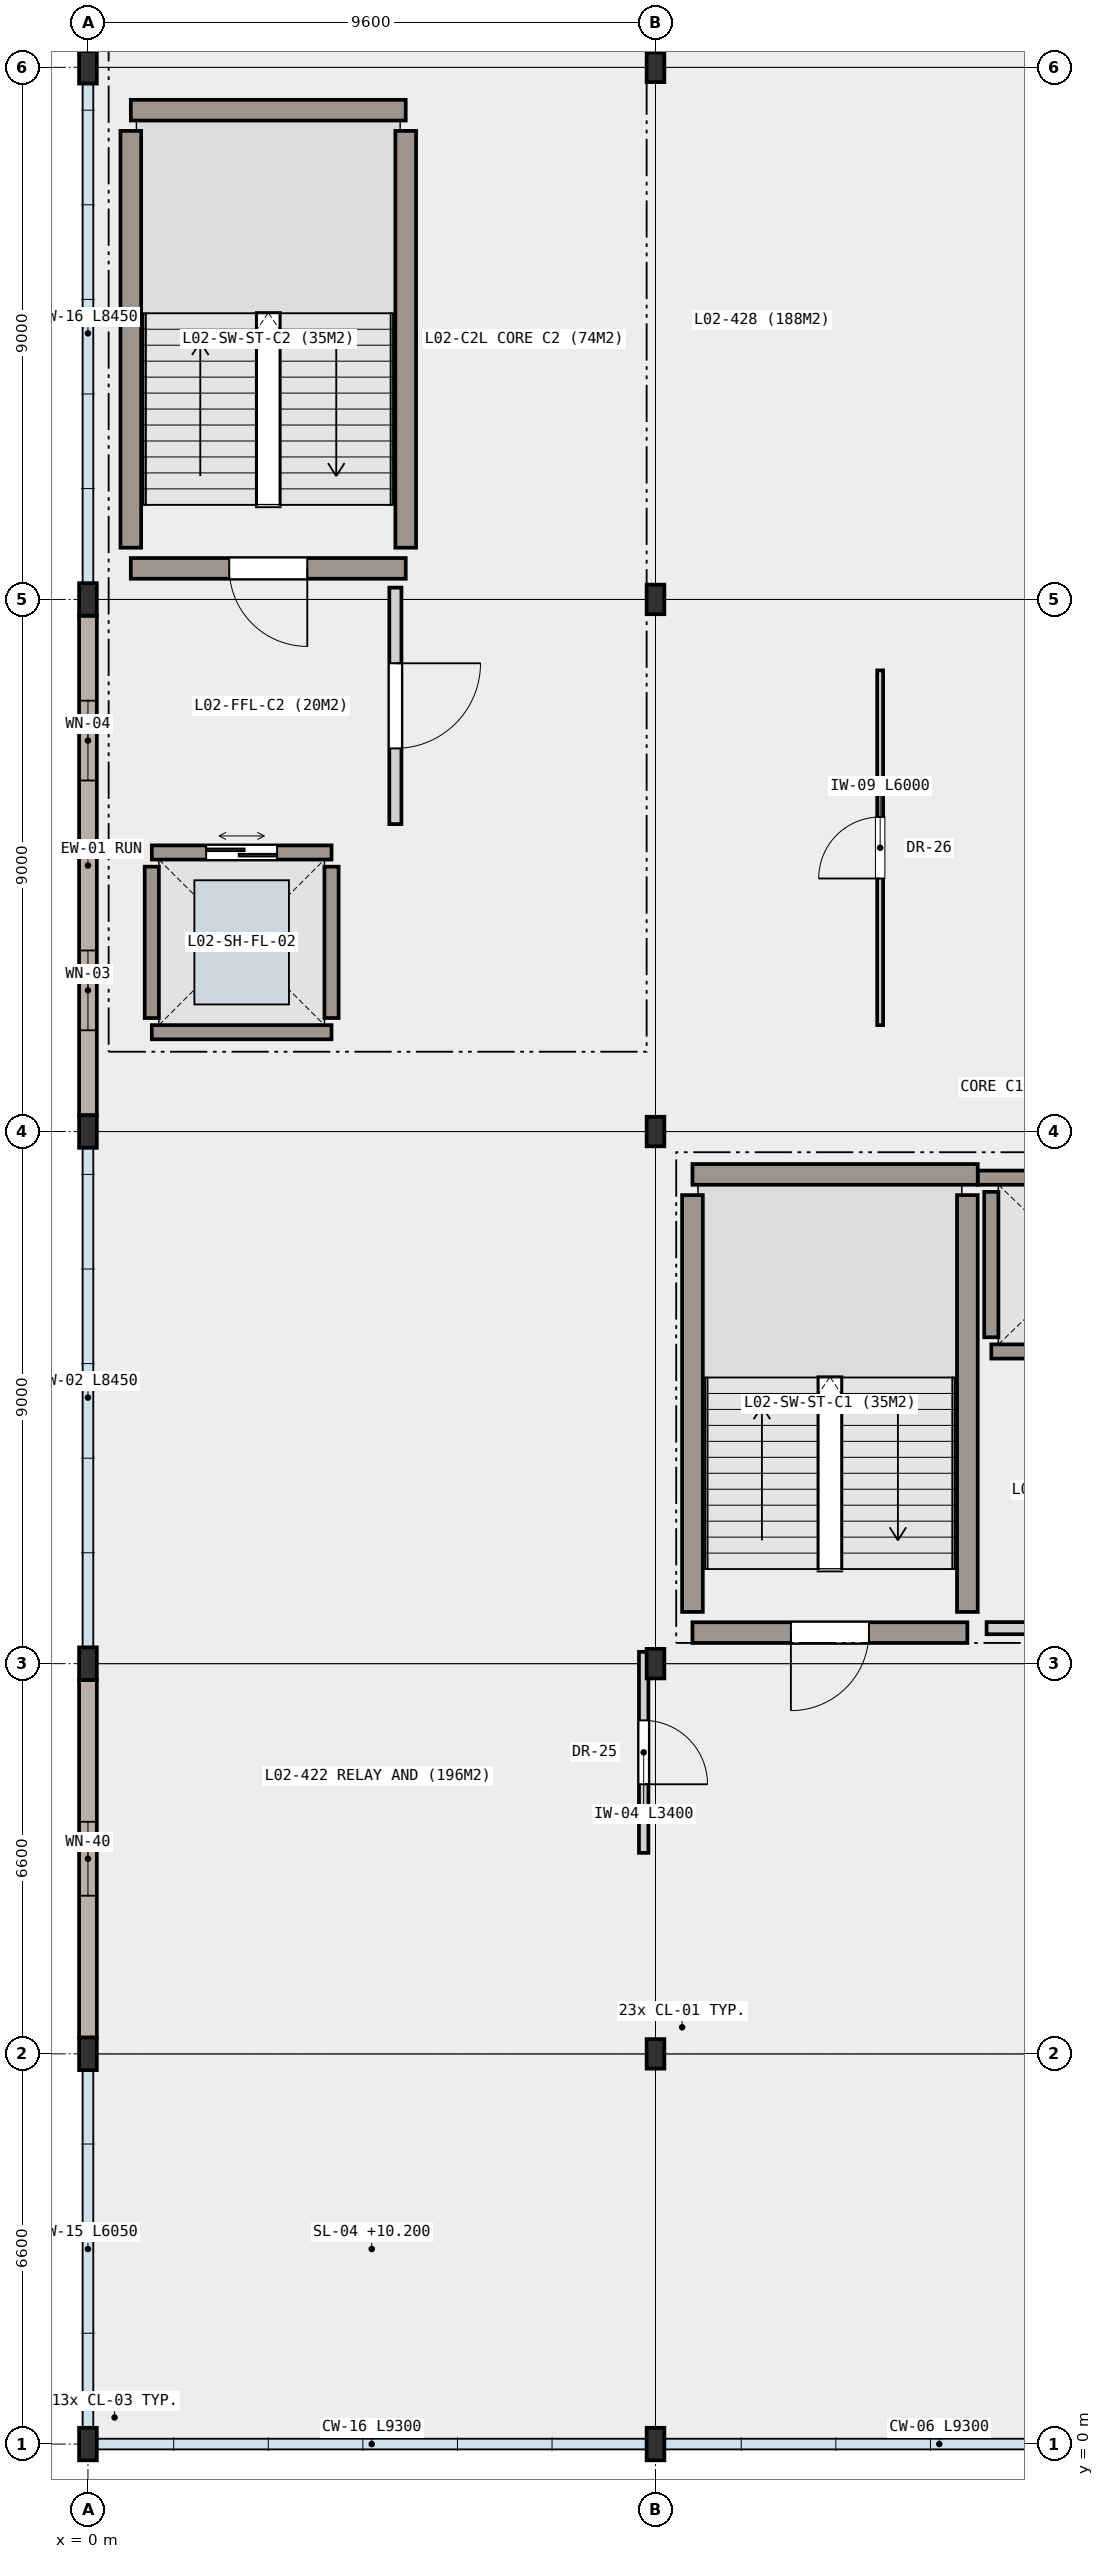
"""IFC4 building model, lengths in metres.
Left out: names, types, materials, properties, quantities, classifications, styles, units other than length and angle.
Written with IfcOpenShell. Run it as: python <this file> out.ifc"""

import sys

from ifc_helpers import new_model, si_unit, direction, frame, frame_2d, origin, origin_2d, place, context, subcontext, project, spatial, rectangle, i_section, extrude, element, fill, save


model = new_model("IFC4")
c1 = context("Model", 3, precision=1e-05, world=origin(), true_north=direction((0.0, 1.0)))
c2 = subcontext(c1, "Body", "Model", "MODEL_VIEW")
j1 = project(units=[si_unit("LENGTHUNIT", "METRE"), si_unit("PLANEANGLEUNIT", "RADIAN")], contexts=[c1])
p1 = place(None, origin())
s1 = spatial("IfcSite", under=j1, at=p1, CompositionType="ELEMENT")
p2 = place(p1, origin())
s2 = spatial("IfcBuilding", under=s1, at=p2, CompositionType="ELEMENT")
p3 = place(p2, frame((0.0, 0.0, 10.2)))
s3 = spatial("IfcBuildingStorey", under=s2, at=p3, CompositionType="ELEMENT", Elevation=10.2)
for number, where, z_axis, x_axis in (
    (1, (0.0, 0.0, 0.0), (0.0, 0.0, 1.0), (1.0, 0.0, 0.0)),
    (2, (0.0, 6.6, 0.0), (0.0, 0.0, 1.0), (1.0, 0.0, 0.0)),
    (3, (0.0, 13.2, 0.0), (0.0, 0.0, 1.0), (1.0, 0.0, 0.0)),
    (4, (0.0, 22.2, 0.0), (0.0, 0.0, 1.0), (1.0, 0.0, 0.0)),
    (5, (0.0, 31.2, 0.0), (0.0, 0.0, 1.0), (1.0, 0.0, 0.0)),
    (6, (0.0, 40.2, 0.0), (0.0, 0.0, 1.0), (1.0, 0.0, 0.0)),
    (7, (9.6, 0.0, 0.0), (0.0, 0.0, 1.0), (1.0, 0.0, 0.0)),
):
    element("IfcColumn", number, at=place(p3, frame(where, z_axis=z_axis, x_axis=x_axis)), inside=s3, PredefinedType="COLUMN", context=c2, shape_type="SweptSolid", body=[
        extrude(i_section(OverallWidth=0.3, OverallDepth=0.55, WebThickness=0.015, FlangeThickness=0.029, FilletRadius=0.027, at=origin_2d()), origin(), (0.0, 0.0, 1.0), 4.2),
    ])
for number, where, z_axis, x_axis in (
    (8, (9.6, 6.6, 0.0), (0.0, 0.0, 1.0), (1.0, 0.0, 0.0)),
    (9, (9.6, 13.2, 0.0), (0.0, 0.0, 1.0), (1.0, 0.0, 0.0)),
    (10, (9.6, 22.2, 0.0), (0.0, 0.0, 1.0), (1.0, 0.0, 0.0)),
    (11, (9.6, 31.2, 0.0), (0.0, 0.0, 1.0), (1.0, 0.0, 0.0)),
    (12, (9.6, 40.2, 0.0), (0.0, 0.0, 1.0), (1.0, 0.0, 0.0)),
):
    element("IfcColumn", number, at=place(p3, frame(where, z_axis=z_axis, x_axis=x_axis)), inside=s3, PredefinedType="COLUMN", context=c2, shape_type="SweptSolid", body=[
        extrude(i_section(OverallWidth=0.3, OverallDepth=0.5, WebThickness=0.014, FlangeThickness=0.028, FilletRadius=0.027, at=origin_2d()), origin(), (0.0, 0.0, 1.0), 4.2),
    ])
p4 = place(p3, frame((0.0, 6.875, 0.0), z_axis=(0.0, 0.0, 1.0), x_axis=(0.0, 1.0, 0.0)))
e13 = element("IfcWall", 13, at=p4, inside=s3, PredefinedType="SOLIDWALL", context=c2, shape_type="SweptSolid", body=[
    extrude(rectangle(XDim=6.05, YDim=0.3, at=frame_2d((3.025, 0.0))), origin(), (0.0, 0.0, 1.0), 3.52),
])
p5 = place(p4, frame((2.4, 0.0, 0.85)))
e14 = element("IfcOpeningElement", 14, at=p5, cuts=e13, PredefinedType="OPENING", context=c2, shape_type="SweptSolid", body=[
    extrude(rectangle(XDim=1.25, YDim=2.15, at=frame_2d((0.625, 1.075))), frame((0.0, 0.16, 0.0), z_axis=(0.0, -1.0, 0.0), x_axis=(1.0, 0.0, 0.0)), (0.0, 0.0, 1.0), 0.32),
])
p6 = place(p3, frame((0.0, 22.475, 0.0), z_axis=(0.0, 0.0, 1.0), x_axis=(0.0, 1.0, 0.0)))
e15 = element("IfcWall", 15, at=p6, inside=s3, PredefinedType="SOLIDWALL", context=c2, shape_type="SweptSolid", body=[
    extrude(rectangle(XDim=8.45, YDim=0.3, at=frame_2d((4.225, 0.0))), origin(), (0.0, 0.0, 1.0), 3.52),
])
p7 = place(p6, frame((1.438, 0.0, 0.85)))
e16 = element("IfcOpeningElement", 16, at=p7, cuts=e15, PredefinedType="OPENING", context=c2, shape_type="SweptSolid", body=[
    extrude(rectangle(XDim=1.35, YDim=1.5, at=frame_2d((0.675, 0.75))), frame((0.0, 0.16, 0.0), z_axis=(0.0, -1.0, 0.0), x_axis=(1.0, 0.0, 0.0)), (0.0, 0.0, 1.0), 0.32),
])
p8 = place(p6, frame((5.663, 0.0, 0.85)))
e17 = element("IfcOpeningElement", 17, at=p8, cuts=e15, PredefinedType="OPENING", context=c2, shape_type="SweptSolid", body=[
    extrude(rectangle(XDim=1.35, YDim=1.85, at=frame_2d((0.675, 0.925))), frame((0.0, 0.16, 0.0), z_axis=(0.0, -1.0, 0.0), x_axis=(1.0, 0.0, 0.0)), (0.0, 0.0, 1.0), 0.32),
])
p9 = place(p3, frame((18.32, 18.48, 0.0), z_axis=(0.0, 0.0, 1.0), x_axis=(-1.0, 0.0, 0.0)))
e18 = element("IfcWall", 18, at=p9, inside=s3, PredefinedType="SHEAR", context=c2, shape_type="SweptSolid", body=[
    extrude(rectangle(XDim=3.04, YDim=0.24, at=frame_2d((1.52, 0.0))), origin(), (0.0, 0.0, 1.0), 3.95),
])
p10 = place(p9, frame((0.92, 0.0, 0.0)))
e19 = element("IfcOpeningElement", 19, at=p10, cuts=e18, PredefinedType="OPENING", context=c2, shape_type="SweptSolid", body=[
    extrude(rectangle(XDim=1.2, YDim=2.15, at=frame_2d((0.6, 1.075))), frame((0.0, 0.13, 0.0), z_axis=(0.0, -1.0, 0.0), x_axis=(1.0, 0.0, 0.0)), (0.0, 0.0, 1.0), 0.26),
])
p11 = place(p3, frame((15.05, 21.42, 0.0), z_axis=(0.0, 0.0, 1.0), x_axis=(1.0, 0.0, 0.0)))
e20 = element("IfcWall", 20, at=p11, inside=s3, PredefinedType="SHEAR", context=c2, shape_type="SweptSolid", body=[
    extrude(rectangle(XDim=3.27, YDim=0.24, at=frame_2d((1.635, 0.0))), origin(), (0.0, 0.0, 1.0), 3.95),
])
p12 = place(p3, frame((15.28, 18.72, 0.0), z_axis=(0.0, 0.0, 1.0), x_axis=(0.0, 1.0, 0.0)))
e21 = element("IfcWall", 21, at=p12, inside=s3, PredefinedType="SHEAR", context=c2, shape_type="SweptSolid", body=[
    extrude(rectangle(XDim=2.46, YDim=0.24, at=frame_2d((1.23, 0.0))), origin(), (0.0, 0.0, 1.0), 3.95),
])
p13 = place(p3, frame((4.12, 23.88, 0.0), z_axis=(0.0, 0.0, 1.0), x_axis=(-1.0, 0.0, 0.0)))
e22 = element("IfcWall", 22, at=p13, inside=s3, PredefinedType="SHEAR", context=c2, shape_type="SweptSolid", body=[
    extrude(rectangle(XDim=3.04, YDim=0.24, at=frame_2d((1.52, 0.0))), origin(), (0.0, 0.0, 1.0), 3.95),
])
p14 = place(p3, frame((1.08, 26.92, 0.0), z_axis=(0.0, 0.0, 1.0), x_axis=(1.0, 0.0, 0.0)))
e23 = element("IfcWall", 23, at=p14, inside=s3, PredefinedType="SHEAR", context=c2, shape_type="SweptSolid", body=[
    extrude(rectangle(XDim=3.04, YDim=0.24, at=frame_2d((1.52, 0.0))), origin(), (0.0, 0.0, 1.0), 3.95),
])
p15 = place(p14, frame((0.92, 0.0, 0.0)))
e24 = element("IfcOpeningElement", 24, at=p15, cuts=e23, PredefinedType="OPENING", context=c2, shape_type="SweptSolid", body=[
    extrude(rectangle(XDim=1.2, YDim=2.15, at=frame_2d((0.6, 1.075))), frame((0.0, 0.13, 0.0), z_axis=(0.0, -1.0, 0.0), x_axis=(1.0, 0.0, 0.0)), (0.0, 0.0, 1.0), 0.26),
])
for number, where, z_axis, x_axis in (
    (25, (1.08, 24.12, 0.0), (0.0, 0.0, 1.0), (0.0, 1.0, 0.0)),
    (26, (4.12, 26.68, 0.0), (0.0, 0.0, 1.0), (0.0, -1.0, 0.0)),
):
    element("IfcWall", number, at=place(p3, frame(where, z_axis=z_axis, x_axis=x_axis)), inside=s3, PredefinedType="SHEAR", context=c2, shape_type="SweptSolid", body=[
        extrude(rectangle(XDim=2.56, YDim=0.24, at=frame_2d((1.28, 0.0))), origin(), (0.0, 0.0, 1.0), 3.95),
    ])
p16 = place(p3, frame((14.875, 13.725, 0.0), z_axis=(0.0, 0.0, 1.0), x_axis=(-1.0, 0.0, 0.0)))
e27 = element("IfcWall", 27, at=p16, inside=s3, PredefinedType="SHEAR", context=c2, shape_type="SweptSolid", body=[
    extrude(rectangle(XDim=4.65, YDim=0.35, at=frame_2d((2.325, 0.0))), origin(), (0.0, 0.0, 1.0), 3.95),
])
p17 = place(p16, frame((1.665, 0.0, 0.0)))
e28 = element("IfcOpeningElement", 28, at=p17, cuts=e27, PredefinedType="OPENING", context=c2, shape_type="SweptSolid", body=[
    extrude(rectangle(XDim=1.32, YDim=2.15, at=frame_2d((0.66, 1.075))), frame((0.0, 0.185, 0.0), z_axis=(0.0, -1.0, 0.0), x_axis=(1.0, 0.0, 0.0)), (0.0, 0.0, 1.0), 0.37),
])
p18 = place(p3, frame((10.225, 21.475, 0.0), z_axis=(0.0, 0.0, 1.0), x_axis=(1.0, 0.0, 0.0)))
e29 = element("IfcWall", 29, at=p18, inside=s3, PredefinedType="SHEAR", context=c2, shape_type="SweptSolid", body=[
    extrude(rectangle(XDim=4.825, YDim=0.35, at=frame_2d((2.413, 0.0))), origin(), (0.0, 0.0, 1.0), 3.95),
])
for number, where, z_axis, x_axis in (
    (30, (10.225, 14.075, 0.0), (0.0, 0.0, 1.0), (0.0, 1.0, 0.0)),
    (31, (14.875, 21.125, 0.0), (0.0, 0.0, 1.0), (0.0, -1.0, 0.0)),
):
    element("IfcWall", number, at=place(p3, frame(where, z_axis=z_axis, x_axis=x_axis)), inside=s3, PredefinedType="SHEAR", context=c2, shape_type="SweptSolid", body=[
        extrude(rectangle(XDim=7.05, YDim=0.35, at=frame_2d((3.525, 0.0))), origin(), (0.0, 0.0, 1.0), 3.95),
    ])
p19 = place(p3, frame((5.375, 31.725, 0.0), z_axis=(0.0, 0.0, 1.0), x_axis=(-1.0, 0.0, 0.0)))
e32 = element("IfcWall", 32, at=p19, inside=s3, PredefinedType="SHEAR", context=c2, shape_type="SweptSolid", body=[
    extrude(rectangle(XDim=4.65, YDim=0.35, at=frame_2d((2.325, 0.0))), origin(), (0.0, 0.0, 1.0), 3.95),
])
p20 = place(p19, frame((1.665, 0.0, 0.0)))
e33 = element("IfcOpeningElement", 33, at=p20, cuts=e32, PredefinedType="OPENING", context=c2, shape_type="SweptSolid", body=[
    extrude(rectangle(XDim=1.32, YDim=2.15, at=frame_2d((0.66, 1.075))), frame((0.0, 0.185, 0.0), z_axis=(0.0, -1.0, 0.0), x_axis=(1.0, 0.0, 0.0)), (0.0, 0.0, 1.0), 0.37),
])
p21 = place(p3, frame((0.725, 39.475, 0.0), z_axis=(0.0, 0.0, 1.0), x_axis=(1.0, 0.0, 0.0)))
e34 = element("IfcWall", 34, at=p21, inside=s3, PredefinedType="SHEAR", context=c2, shape_type="SweptSolid", body=[
    extrude(rectangle(XDim=4.65, YDim=0.35, at=frame_2d((2.325, 0.0))), origin(), (0.0, 0.0, 1.0), 3.95),
])
for number, where, z_axis, x_axis in (
    (35, (0.725, 32.075, 0.0), (0.0, 0.0, 1.0), (0.0, 1.0, 0.0)),
    (36, (5.375, 39.125, 0.0), (0.0, 0.0, 1.0), (0.0, -1.0, 0.0)),
):
    element("IfcWall", number, at=place(p3, frame(where, z_axis=z_axis, x_axis=x_axis)), inside=s3, PredefinedType="SHEAR", context=c2, shape_type="SweptSolid", body=[
        extrude(rectangle(XDim=7.05, YDim=0.35, at=frame_2d((3.525, 0.0))), origin(), (0.0, 0.0, 1.0), 3.95),
    ])
p22 = place(p3, frame((18.6, 13.8, 0.0), z_axis=(0.0, 0.0, 1.0), x_axis=(-1.0, 0.0, 0.0)))
e37 = element("IfcWall", 37, at=p22, inside=s3, PredefinedType="PARTITIONING", context=c2, shape_type="SweptSolid", body=[
    extrude(rectangle(XDim=3.4, YDim=0.205, at=frame_2d((1.7, 0.0))), origin(), (0.0, 0.0, 1.0), 3.95),
])
p23 = place(p22, frame((0.98, 0.0, 0.0)))
e38 = element("IfcOpeningElement", 38, at=p23, cuts=e37, PredefinedType="OPENING", context=c2, shape_type="SweptSolid", body=[
    extrude(rectangle(XDim=1.44, YDim=2.18, at=frame_2d((0.72, 1.09))), frame((0.0, 0.113, 0.0), z_axis=(0.0, -1.0, 0.0), x_axis=(1.0, 0.0, 0.0)), (0.0, 0.0, 1.0), 0.225),
])
p24 = place(p3, frame((5.2, 31.4, 0.0), z_axis=(0.0, 0.0, 1.0), x_axis=(0.0, -1.0, 0.0)))
e39 = element("IfcWall", 39, at=p24, inside=s3, PredefinedType="PARTITIONING", context=c2, shape_type="SweptSolid", body=[
    extrude(rectangle(XDim=4.0, YDim=0.205, at=frame_2d((2.0, 0.0))), origin(), (0.0, 0.0, 1.0), 3.95),
])
p25 = place(p24, frame((1.28, 0.0, 0.0)))
e40 = element("IfcOpeningElement", 40, at=p25, cuts=e39, PredefinedType="OPENING", context=c2, shape_type="SweptSolid", body=[
    extrude(rectangle(XDim=1.44, YDim=2.18, at=frame_2d((0.72, 1.09))), frame((0.0, 0.113, 0.0), z_axis=(0.0, -1.0, 0.0), x_axis=(1.0, 0.0, 0.0)), (0.0, 0.0, 1.0), 0.225),
])
p26 = place(p3, frame((13.4, 24.0, 0.0), z_axis=(0.0, 0.0, 1.0), x_axis=(0.0, 1.0, 0.0)))
e41 = element("IfcWall", 41, at=p26, inside=s3, PredefinedType="PARTITIONING", context=c2, shape_type="SweptSolid", body=[
    extrude(rectangle(XDim=6.0, YDim=0.1, at=frame_2d((3.0, 0.0))), origin(), (0.0, 0.0, 1.0), 3.95),
])
p27 = place(p26, frame((2.48, 0.0, 0.0)))
e42 = element("IfcOpeningElement", 42, at=p27, cuts=e41, PredefinedType="OPENING", context=c2, shape_type="SweptSolid", body=[
    extrude(rectangle(XDim=1.04, YDim=2.12, at=frame_2d((0.52, 1.06))), frame((0.0, 0.06, 0.0), z_axis=(0.0, -1.0, 0.0), x_axis=(1.0, 0.0, 0.0)), (0.0, 0.0, 1.0), 0.12),
])
p28 = place(p3, frame((9.4, 13.4, 0.0), z_axis=(0.0, 0.0, 1.0), x_axis=(0.0, -1.0, 0.0)))
e43 = element("IfcWall", 43, at=p28, inside=s3, PredefinedType="PARTITIONING", context=c2, shape_type="SweptSolid", body=[
    extrude(rectangle(XDim=3.4, YDim=0.16, at=frame_2d((1.7, 0.0))), origin(), (0.0, 0.0, 1.0), 3.42),
])
p29 = place(p28, frame((1.16, 0.0, 0.0)))
e44 = element("IfcOpeningElement", 44, at=p29, cuts=e43, PredefinedType="OPENING", context=c2, shape_type="SweptSolid", body=[
    extrude(rectangle(XDim=1.08, YDim=2.12, at=frame_2d((0.54, 1.06))), frame((0.0, 0.09, 0.0), z_axis=(0.0, -1.0, 0.0), x_axis=(1.0, 0.0, 0.0)), (0.0, 0.0, 1.0), 0.18),
])
p30 = place(p5, origin())
e45 = element("IfcWindow", 45, at=p30, inside=s3, PartitioningType="SINGLE_PANEL", PredefinedType="WINDOW", context=c2, shape_type="SweptSolid", body=[
    extrude(rectangle(XDim=1.25, YDim=2.15, at=frame_2d((0.625, 1.075))), frame((0.0, 0.03, 0.0), z_axis=(0.0, -1.0, 0.0), x_axis=(1.0, 0.0, 0.0)), (0.0, 0.0, 1.0), 0.06),
])
fill(e14, e45)
p31 = place(p7, origin())
e46 = element("IfcWindow", 46, at=p31, inside=s3, PartitioningType="SINGLE_PANEL", PredefinedType="WINDOW", context=c2, shape_type="SweptSolid", body=[
    extrude(rectangle(XDim=1.35, YDim=1.5, at=frame_2d((0.675, 0.75))), frame((0.0, 0.03, 0.0), z_axis=(0.0, -1.0, 0.0), x_axis=(1.0, 0.0, 0.0)), (0.0, 0.0, 1.0), 0.06),
])
fill(e16, e46)
p32 = place(p8, origin())
e47 = element("IfcWindow", 47, at=p32, inside=s3, PartitioningType="SINGLE_PANEL", PredefinedType="WINDOW", context=c2, shape_type="SweptSolid", body=[
    extrude(rectangle(XDim=1.35, YDim=1.85, at=frame_2d((0.675, 0.925))), frame((0.0, 0.03, 0.0), z_axis=(0.0, -1.0, 0.0), x_axis=(1.0, 0.0, 0.0)), (0.0, 0.0, 1.0), 0.06),
])
fill(e17, e47)
p33 = place(p15, origin())
e48 = element("IfcDoor", 48, at=p33, inside=s3, OperationType="DOUBLE_DOOR_SLIDING", PredefinedType="DOOR", context=c2, shape_type="SweptSolid", body=[
    extrude(rectangle(XDim=1.2, YDim=2.15, at=frame_2d((0.6, 1.075))), frame((0.0, 0.025, 0.0), z_axis=(0.0, -1.0, 0.0), x_axis=(1.0, 0.0, 0.0)), (0.0, 0.0, 1.0), 0.05),
])
fill(e24, e48)
p34 = place(p17, origin())
e49 = element("IfcDoor", 49, at=p34, inside=s3, OperationType="SINGLE_SWING_RIGHT", PredefinedType="DOOR", context=c2, shape_type="SweptSolid", body=[
    extrude(rectangle(XDim=1.32, YDim=2.15, at=frame_2d((0.66, 1.075))), frame((0.0, 0.025, 0.0), z_axis=(0.0, -1.0, 0.0), x_axis=(1.0, 0.0, 0.0)), (0.0, 0.0, 1.0), 0.05),
])
fill(e28, e49)
p35 = place(p20, origin())
e50 = element("IfcDoor", 50, at=p35, inside=s3, OperationType="SINGLE_SWING_LEFT", PredefinedType="DOOR", context=c2, shape_type="SweptSolid", body=[
    extrude(rectangle(XDim=1.32, YDim=2.15, at=frame_2d((0.66, 1.075))), frame((0.0, 0.025, 0.0), z_axis=(0.0, -1.0, 0.0), x_axis=(1.0, 0.0, 0.0)), (0.0, 0.0, 1.0), 0.05),
])
fill(e33, e50)
p36 = place(p25, origin())
e51 = element("IfcDoor", 51, at=p36, inside=s3, OperationType="SINGLE_SWING_LEFT", PredefinedType="DOOR", context=c2, shape_type="SweptSolid", body=[
    extrude(rectangle(XDim=1.44, YDim=2.18, at=frame_2d((0.72, 1.09))), frame((0.0, 0.025, 0.0), z_axis=(0.0, -1.0, 0.0), x_axis=(1.0, 0.0, 0.0)), (0.0, 0.0, 1.0), 0.05),
])
fill(e40, e51)
p37 = place(p27, origin())
e52 = element("IfcDoor", 52, at=p37, inside=s3, OperationType="SINGLE_SWING_LEFT", PredefinedType="DOOR", context=c2, shape_type="SweptSolid", body=[
    extrude(rectangle(XDim=1.04, YDim=2.12, at=frame_2d((0.52, 1.06))), frame((0.0, 0.025, 0.0), z_axis=(0.0, -1.0, 0.0), x_axis=(1.0, 0.0, 0.0)), (0.0, 0.0, 1.0), 0.05),
])
fill(e42, e52)
p38 = place(p29, origin())
e53 = element("IfcDoor", 53, at=p38, inside=s3, OperationType="SINGLE_SWING_RIGHT", PredefinedType="DOOR", context=c2, shape_type="SweptSolid", body=[
    extrude(rectangle(XDim=1.08, YDim=2.12, at=frame_2d((0.54, 1.06))), frame((0.0, 0.025, 0.0), z_axis=(0.0, -1.0, 0.0), x_axis=(1.0, 0.0, 0.0)), (0.0, 0.0, 1.0), 0.05),
])
fill(e44, e53)
save(model, sys.argv[1])
